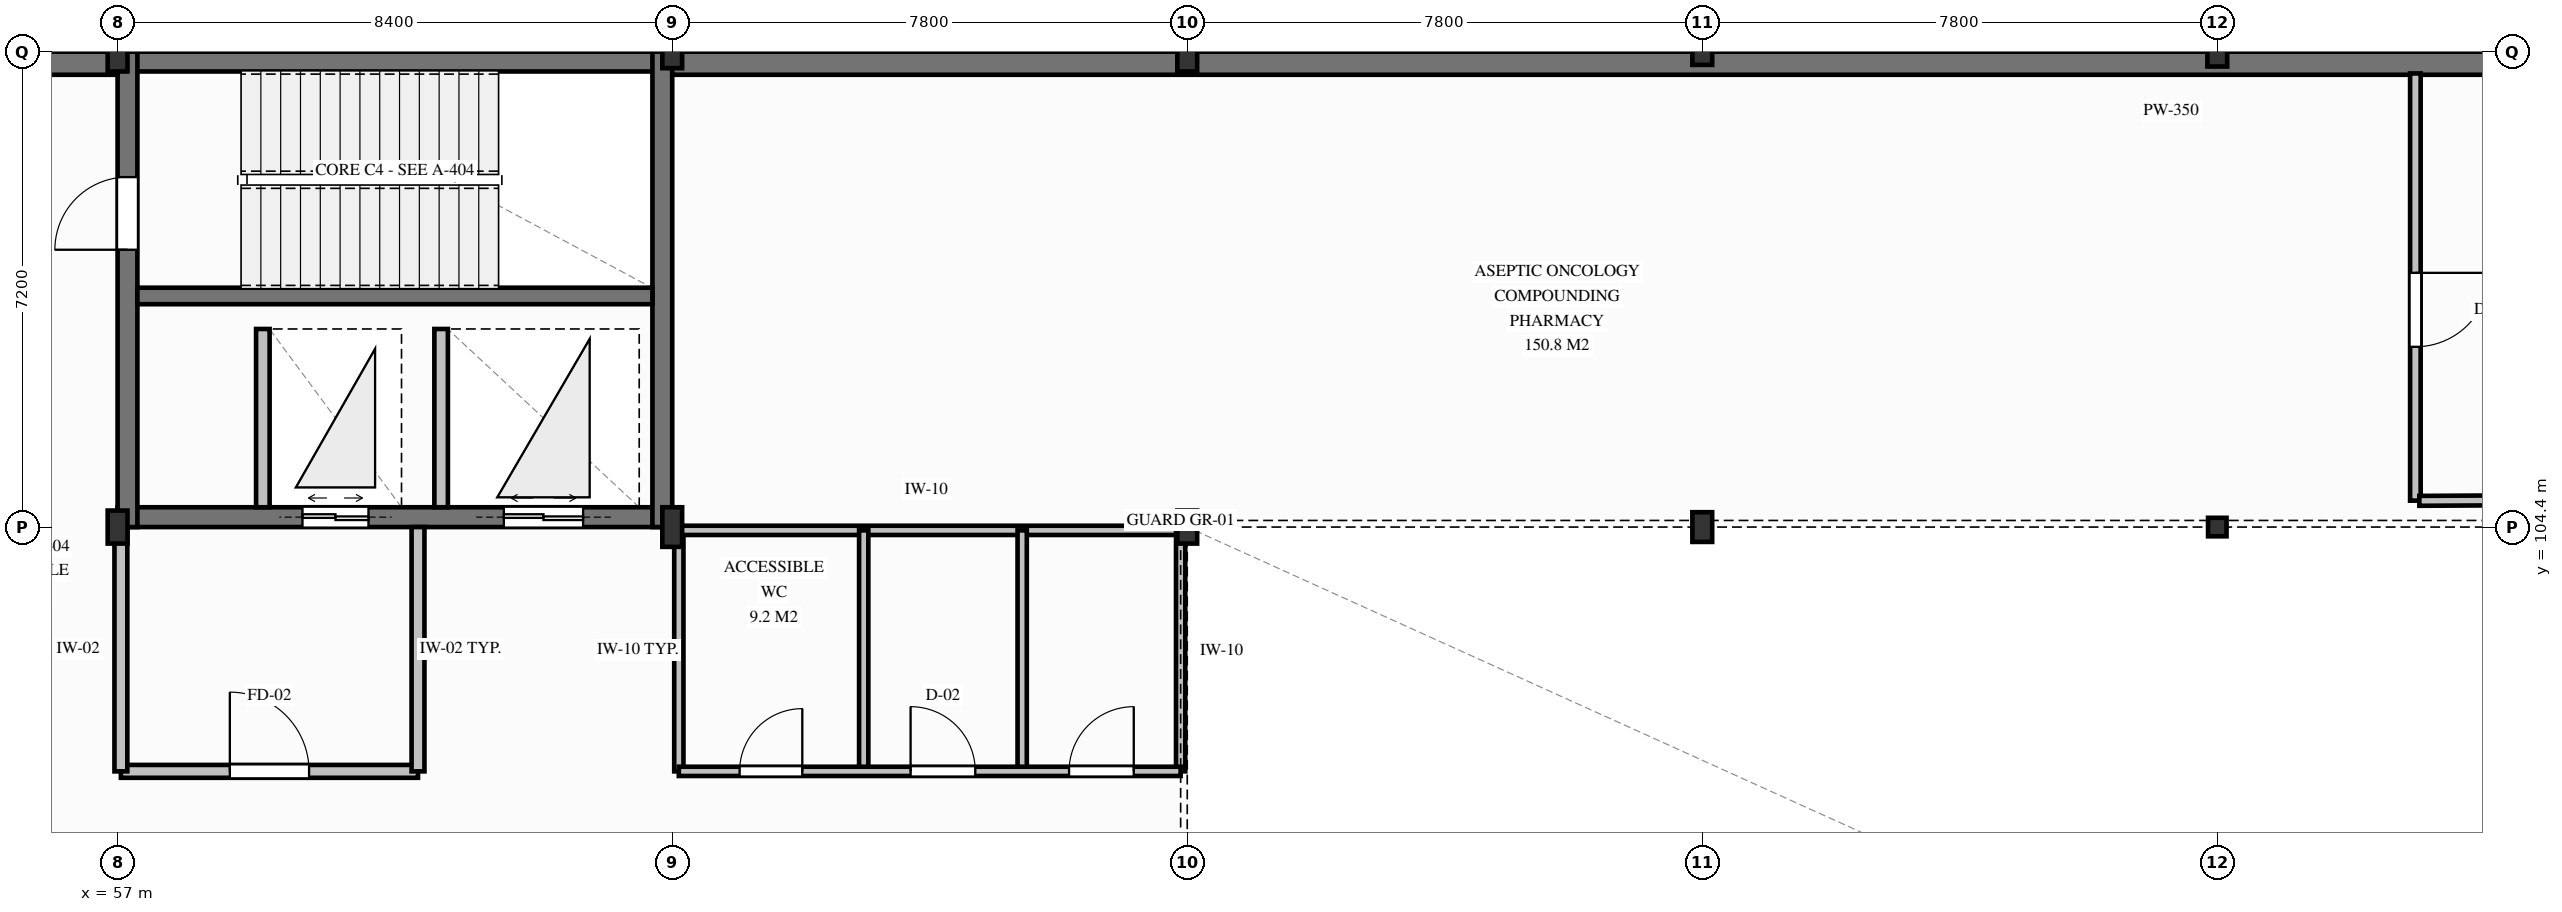
"""IFC4 building model, lengths in metres.
Left out: names, types, materials, properties, quantities, classifications, styles, units other than length and angle.
Written with IfcOpenShell. Run it as: python <this file> out.ifc"""

import sys

from ifc_helpers import new_model, si_unit, direction, frame, frame_2d, origin, origin_2d, place, context, subcontext, project, spatial, rectangle, i_section, extrude, element, fill, save


model = new_model("IFC4")
c1 = context("Model", 3, precision=1e-05, world=origin(), true_north=direction((0.0, 1.0)))
c2 = subcontext(c1, "Body", "Model", "MODEL_VIEW")
j1 = project(units=[si_unit("LENGTHUNIT", "METRE"), si_unit("PLANEANGLEUNIT", "RADIAN")], contexts=[c1])
p1 = place(None, origin())
s1 = spatial("IfcSite", under=j1, at=p1, CompositionType="ELEMENT")
p2 = place(p1, origin())
s2 = spatial("IfcBuilding", under=s1, at=p2, CompositionType="ELEMENT")
p3 = place(p2, frame((0.0, 0.0, 9.0)))
s3 = spatial("IfcBuildingStorey", under=s2, at=p3, CompositionType="ELEMENT", Elevation=9.0)
p4 = place(p3, frame((57.0, 111.45, 0.0), z_axis=(0.0, 0.0, 1.0), x_axis=(1.0, 0.0, 0.0)))
e1 = element("IfcWall", 1, at=p4, inside=s3, PredefinedType="SHEAR", context=c2, shape_type="SweptSolid", body=[
    extrude(rectangle(XDim=8.4, YDim=0.3, at=frame_2d((4.2, 0.0))), origin(), (0.0, 0.0, 1.0), 4.2),
])
p5 = place(p3, frame((57.0, 104.55, 0.0), z_axis=(0.0, 0.0, 1.0), x_axis=(1.0, 0.0, 0.0)))
e2 = element("IfcWall", 2, at=p5, inside=s3, PredefinedType="SHEAR", context=c2, shape_type="SweptSolid", body=[
    extrude(rectangle(XDim=8.4, YDim=0.3, at=frame_2d((4.2, 0.0))), origin(), (0.0, 0.0, 1.0), 4.2),
])
p6 = place(p5, frame((2.8, 0.0, 0.0)))
e3 = element("IfcOpeningElement", 3, at=p6, cuts=e2, PredefinedType="OPENING", context=c2, shape_type="SweptSolid", body=[
    extrude(rectangle(XDim=1.0, YDim=2.1, at=frame_2d((0.5, 1.05))), frame((0.0, 0.16, 0.0), z_axis=(0.0, -1.0, 0.0), x_axis=(1.0, 0.0, 0.0)), (0.0, 0.0, 1.0), 0.32),
])
p7 = place(p5, frame((5.85, 0.0, 0.0)))
e4 = element("IfcOpeningElement", 4, at=p7, cuts=e2, PredefinedType="OPENING", context=c2, shape_type="SweptSolid", body=[
    extrude(rectangle(XDim=1.2, YDim=2.15, at=frame_2d((0.6, 1.075))), frame((0.0, 0.16, 0.0), z_axis=(0.0, -1.0, 0.0), x_axis=(1.0, 0.0, 0.0)), (0.0, 0.0, 1.0), 0.32),
])
p8 = place(p3, frame((57.15, 104.4, 0.0), z_axis=(0.0, 0.0, 1.0), x_axis=(0.0, 1.0, 0.0)))
e5 = element("IfcWall", 5, at=p8, inside=s3, PredefinedType="SHEAR", context=c2, shape_type="SweptSolid", body=[
    extrude(rectangle(XDim=7.2, YDim=0.3, at=frame_2d((3.6, 0.0))), origin(), (0.0, 0.0, 1.0), 4.2),
])
p9 = place(p8, frame((4.2, 0.0, 0.0)))
e6 = element("IfcOpeningElement", 6, at=p9, cuts=e5, PredefinedType="OPENING", context=c2, shape_type="SweptSolid", body=[
    extrude(rectangle(XDim=1.1, YDim=2.15, at=frame_2d((0.55, 1.075))), frame((0.0, 0.16, 0.0), z_axis=(0.0, -1.0, 0.0), x_axis=(1.0, 0.0, 0.0)), (0.0, 0.0, 1.0), 0.32),
])
p10 = place(p3, frame((65.25, 104.4, 0.0), z_axis=(0.0, 0.0, 1.0), x_axis=(0.0, 1.0, 0.0)))
e7 = element("IfcWall", 7, at=p10, inside=s3, PredefinedType="SHEAR", context=c2, shape_type="SweptSolid", body=[
    extrude(rectangle(XDim=7.2, YDim=0.3, at=frame_2d((3.6, 0.0))), origin(), (0.0, 0.0, 1.0), 4.2),
])
p11 = place(p3, frame((57.3, 107.9, 0.0), z_axis=(0.0, 0.0, 1.0), x_axis=(1.0, 0.0, 0.0)))
e8 = element("IfcWall", 8, at=p11, inside=s3, PredefinedType="SHEAR", context=c2, shape_type="SweptSolid", body=[
    extrude(rectangle(XDim=7.8, YDim=0.25, at=frame_2d((3.9, 0.0))), origin(), (0.0, 0.0, 1.0), 4.2),
])
p12 = place(p3, frame((49.2, 111.425, 0.0), z_axis=(0.0, 0.0, 1.0), x_axis=(1.0, 0.0, 0.0)))
e9 = element("IfcWall", 9, at=p12, inside=s3, PredefinedType="SHEAR", context=c2, shape_type="SweptSolid", body=[
    extrude(rectangle(XDim=7.8, YDim=0.35, at=frame_2d((3.9, 0.0))), origin(), (0.0, 0.0, 1.0), 4.2),
])
p13 = place(p3, frame((65.4, 111.425, 0.0), z_axis=(0.0, 0.0, 1.0), x_axis=(1.0, 0.0, 0.0)))
e10 = element("IfcWall", 10, at=p13, inside=s3, PredefinedType="SHEAR", context=c2, shape_type="SweptSolid", body=[
    extrude(rectangle(XDim=48.0, YDim=0.35, at=frame_2d((24.0, 0.0))), origin(), (0.0, 0.0, 1.0), 4.2),
])
p14 = place(p3, frame((57.0, 104.4, 0.0), z_axis=(0.0, 0.0, 1.0), x_axis=(1.0, 0.0, 0.0)))
e11 = element("IfcColumn", 11, at=p14, inside=s3, PredefinedType="COLUMN", context=c2, shape_type="SweptSolid", body=[
    extrude(i_section(OverallWidth=0.3, OverallDepth=0.5, WebThickness=0.014, FlangeThickness=0.028, FilletRadius=0.027, at=origin_2d()), origin(), (0.0, 0.0, 1.0), 4.2),
])
for number, where, z_axis, x_axis in (
    (12, (57.0, 111.6, 0.0), (0.0, 0.0, 1.0), (1.0, 0.0, 0.0)),
    (13, (65.4, 104.4, 0.0), (0.0, 0.0, 1.0), (1.0, 0.0, 0.0)),
):
    element("IfcColumn", number, at=place(p3, frame(where, z_axis=z_axis, x_axis=x_axis)), inside=s3, PredefinedType="COLUMN", context=c2, shape_type="SweptSolid", body=[
        extrude(i_section(OverallWidth=0.3, OverallDepth=0.6, WebThickness=0.015, FlangeThickness=0.03, FilletRadius=0.027, at=origin_2d()), origin(), (0.0, 0.0, 1.0), 4.2),
    ])
for number, where, z_axis, x_axis in (
    (14, (65.4, 111.6, 0.0), (0.0, 0.0, 1.0), (1.0, 0.0, 0.0)),
    (15, (73.2, 104.4, 0.0), (0.0, 0.0, 1.0), (1.0, 0.0, 0.0)),
):
    element("IfcColumn", number, at=place(p3, frame(where, z_axis=z_axis, x_axis=x_axis)), inside=s3, PredefinedType="COLUMN", context=c2, shape_type="SweptSolid", body=[
        extrude(i_section(OverallWidth=0.3, OverallDepth=0.5, WebThickness=0.014, FlangeThickness=0.028, FilletRadius=0.027, at=origin_2d()), origin(), (0.0, 0.0, 1.0), 4.2),
    ])
p15 = place(p3, frame((73.2, 111.6, 0.0), z_axis=(0.0, 0.0, 1.0), x_axis=(1.0, 0.0, 0.0)))
e16 = element("IfcColumn", 16, at=p15, inside=s3, PredefinedType="COLUMN", context=c2, shape_type="SweptSolid", body=[
    extrude(i_section(OverallWidth=0.3, OverallDepth=0.6, WebThickness=0.015, FlangeThickness=0.03, FilletRadius=0.027, at=origin_2d()), origin(), (0.0, 0.0, 1.0), 4.2),
])
p16 = place(p3, frame((81.0, 104.4, 0.0), z_axis=(0.0, 0.0, 1.0), x_axis=(1.0, 0.0, 0.0)))
e17 = element("IfcColumn", 17, at=p16, inside=s3, PredefinedType="COLUMN", context=c2, shape_type="SweptSolid", body=[
    extrude(i_section(OverallWidth=0.3, OverallDepth=0.45, WebThickness=0.014, FlangeThickness=0.026, FilletRadius=0.027, at=origin_2d()), origin(), (0.0, 0.0, 1.0), 4.2),
])
p17 = place(p3, frame((81.0, 111.6, 0.0), z_axis=(0.0, 0.0, 1.0), x_axis=(1.0, 0.0, 0.0)))
e18 = element("IfcColumn", 18, at=p17, inside=s3, PredefinedType="COLUMN", context=c2, shape_type="SweptSolid", body=[
    extrude(i_section(OverallWidth=0.3, OverallDepth=0.4, WebThickness=0.013, FlangeThickness=0.024, FilletRadius=0.027, at=origin_2d()), origin(), (0.0, 0.0, 1.0), 4.2),
])
p18 = place(p3, frame((88.8, 104.4, 0.0), z_axis=(0.0, 0.0, 1.0), x_axis=(1.0, 0.0, 0.0)))
e19 = element("IfcColumn", 19, at=p18, inside=s3, PredefinedType="COLUMN", context=c2, shape_type="SweptSolid", body=[
    extrude(i_section(OverallWidth=0.28, OverallDepth=0.28, WebThickness=0.01, FlangeThickness=0.018, FilletRadius=0.024, at=origin_2d()), origin(), (0.0, 0.0, 1.0), 4.2),
])
p19 = place(p3, frame((88.8, 111.6, 0.0), z_axis=(0.0, 0.0, 1.0), x_axis=(1.0, 0.0, 0.0)))
e20 = element("IfcColumn", 20, at=p19, inside=s3, PredefinedType="COLUMN", context=c2, shape_type="SweptSolid", body=[
    extrude(i_section(OverallWidth=0.3, OverallDepth=0.45, WebThickness=0.014, FlangeThickness=0.026, FilletRadius=0.027, at=origin_2d()), origin(), (0.0, 0.0, 1.0), 4.2),
])
for number, where, z_axis, x_axis in (
    (21, (59.2, 104.7, 0.0), (0.0, 0.0, 1.0), (0.0, 1.0, 0.0)),
    (22, (61.9, 104.7, 0.0), (0.0, 0.0, 1.0), (0.0, 1.0, 0.0)),
):
    element("IfcWall", number, at=place(p3, frame(where, z_axis=z_axis, x_axis=x_axis)), inside=s3, PredefinedType="PARTITIONING", context=c2, shape_type="SweptSolid", body=[
        extrude(rectangle(XDim=2.7, YDim=0.205, at=frame_2d((1.35, 0.0))), origin(), (0.0, 0.0, 1.0), 3.93),
    ])
p20 = place(p3, frame((65.5, 100.7, 0.0), z_axis=(0.0, 0.0, 1.0), x_axis=(0.0, 1.0, 0.0)))
e23 = element("IfcWall", 23, at=p20, inside=s3, PredefinedType="PARTITIONING", context=c2, shape_type="SweptSolid", body=[
    extrude(rectangle(XDim=3.68, YDim=0.14, at=frame_2d((1.84, 0.0))), origin(), (0.0, 0.0, 1.0), 3.428),
])
p21 = place(p3, frame((65.4, 104.35, 0.0), z_axis=(0.0, 0.0, 1.0), x_axis=(1.0, 0.0, 0.0)))
e24 = element("IfcWall", 24, at=p21, inside=s3, PredefinedType="PARTITIONING", context=c2, shape_type="SweptSolid", body=[
    extrude(rectangle(XDim=7.7, YDim=0.14, at=frame_2d((3.85, 0.0))), origin(), (0.0, 0.0, 1.0), 3.378),
])
p22 = place(p3, frame((73.1, 100.7, 0.0), z_axis=(0.0, 0.0, 1.0), x_axis=(0.0, 1.0, 0.0)))
e25 = element("IfcWall", 25, at=p22, inside=s3, PredefinedType="PARTITIONING", context=c2, shape_type="SweptSolid", body=[
    extrude(rectangle(XDim=3.65, YDim=0.14, at=frame_2d((1.825, 0.0))), origin(), (0.0, 0.0, 1.0), 3.378),
])
for number, where, z_axis, x_axis in (
    (26, (68.3, 100.7, 0.0), (0.0, 0.0, 1.0), (0.0, 1.0, 0.0)),
    (27, (70.7, 100.7, 0.0), (0.0, 0.0, 1.0), (0.0, 1.0, 0.0)),
):
    element("IfcWall", number, at=place(p3, frame(where, z_axis=z_axis, x_axis=x_axis)), inside=s3, PredefinedType="PARTITIONING", context=c2, shape_type="SweptSolid", body=[
        extrude(rectangle(XDim=3.65, YDim=0.14, at=frame_2d((1.825, 0.0))), origin(), (0.0, 0.0, 1.0), 3.478),
    ])
p23 = place(p3, frame((65.5, 100.7, 0.0), z_axis=(0.0, 0.0, 1.0), x_axis=(1.0, 0.0, 0.0)))
e28 = element("IfcWall", 28, at=p23, inside=s3, PredefinedType="PARTITIONING", context=c2, shape_type="SweptSolid", body=[
    extrude(rectangle(XDim=7.6, YDim=0.14, at=frame_2d((3.8, 0.0))), origin(), (0.0, 0.0, 1.0), 3.528),
])
p24 = place(p23, frame((0.92, 0.0, 0.0)))
e29 = element("IfcOpeningElement", 29, at=p24, cuts=e28, PredefinedType="OPENING", context=c2, shape_type="SweptSolid", body=[
    extrude(rectangle(XDim=0.95, YDim=2.12, at=frame_2d((0.475, 1.06))), frame((0.0, 0.08, 0.0), z_axis=(0.0, -1.0, 0.0), x_axis=(1.0, 0.0, 0.0)), (0.0, 0.0, 1.0), 0.16),
])
p25 = place(p23, frame((3.51, 0.0, 0.0)))
e30 = element("IfcOpeningElement", 30, at=p25, cuts=e28, PredefinedType="OPENING", context=c2, shape_type="SweptSolid", body=[
    extrude(rectangle(XDim=0.98, YDim=2.14, at=frame_2d((0.49, 1.07))), frame((0.0, 0.08, 0.0), z_axis=(0.0, -1.0, 0.0), x_axis=(1.0, 0.0, 0.0)), (0.0, 0.0, 1.0), 0.16),
])
p26 = place(p23, frame((5.91, 0.0, 0.0)))
e31 = element("IfcOpeningElement", 31, at=p26, cuts=e28, PredefinedType="OPENING", context=c2, shape_type="SweptSolid", body=[
    extrude(rectangle(XDim=0.98, YDim=2.14, at=frame_2d((0.49, 1.07))), frame((0.0, 0.08, 0.0), z_axis=(0.0, -1.0, 0.0), x_axis=(1.0, 0.0, 0.0)), (0.0, 0.0, 1.0), 0.16),
])
p27 = place(p3, frame((57.05, 100.7, 0.0), z_axis=(0.0, 0.0, 1.0), x_axis=(1.0, 0.0, 0.0)))
e32 = element("IfcWall", 32, at=p27, inside=s3, PredefinedType="PARTITIONING", context=c2, shape_type="SweptSolid", body=[
    extrude(rectangle(XDim=4.5, YDim=0.195, at=frame_2d((2.25, 0.0))), origin(), (0.0, 0.0, 1.0), 3.638),
])
p28 = place(p27, frame((1.65, 0.0, 0.0)))
e33 = element("IfcOpeningElement", 33, at=p28, cuts=e32, PredefinedType="OPENING", context=c2, shape_type="SweptSolid", body=[
    extrude(rectangle(XDim=1.2, YDim=2.15, at=frame_2d((0.6, 1.075))), frame((0.0, 0.107, 0.0), z_axis=(0.0, -1.0, 0.0), x_axis=(1.0, 0.0, 0.0)), (0.0, 0.0, 1.0), 0.215),
])
p29 = place(p3, frame((61.55, 100.7, 0.0), z_axis=(0.0, 0.0, 1.0), x_axis=(0.0, 1.0, 0.0)))
e34 = element("IfcWall", 34, at=p29, inside=s3, PredefinedType="PARTITIONING", context=c2, shape_type="SweptSolid", body=[
    extrude(rectangle(XDim=3.7, YDim=0.195, at=frame_2d((1.85, 0.0))), origin(), (0.0, 0.0, 1.0), 3.428),
])
p30 = place(p3, frame((57.05, 100.7, 0.0), z_axis=(0.0, 0.0, 1.0), x_axis=(0.0, 1.0, 0.0)))
e35 = element("IfcWall", 35, at=p30, inside=s3, PredefinedType="PARTITIONING", context=c2, shape_type="SweptSolid", body=[
    extrude(rectangle(XDim=3.7, YDim=0.195, at=frame_2d((1.85, 0.0))), origin(), (0.0, 0.0, 1.0), 3.378),
])
p31 = place(p3, frame((91.8, 111.27, 0.0), z_axis=(0.0, 0.0, 1.0), x_axis=(0.0, -1.0, 0.0)))
e36 = element("IfcWall", 36, at=p31, inside=s3, PredefinedType="PARTITIONING", context=c2, shape_type="SweptSolid", body=[
    extrude(rectangle(XDim=6.47, YDim=0.16, at=frame_2d((3.235, 0.0))), origin(), (0.0, 0.0, 1.0), 3.598),
])
p32 = place(p31, frame((3.02, 0.0, 0.0)))
e37 = element("IfcOpeningElement", 37, at=p32, cuts=e36, PredefinedType="OPENING", context=c2, shape_type="SweptSolid", body=[
    extrude(rectangle(XDim=1.12, YDim=2.18, at=frame_2d((0.56, 1.09))), frame((0.0, 0.09, 0.0), z_axis=(0.0, -1.0, 0.0), x_axis=(1.0, 0.0, 0.0)), (0.0, 0.0, 1.0), 0.18),
])
p33 = place(p3, frame((105.38, 104.87, 0.0), z_axis=(0.0, 0.0, 1.0), x_axis=(-0.999985423809, -0.00539927482, 0.0)))
e38 = element("IfcWall", 38, at=p33, inside=s3, PredefinedType="PARTITIONING", context=c2, shape_type="SweptSolid", body=[
    extrude(rectangle(XDim=13.52, YDim=0.15, at=frame_2d((6.76, 0.0))), origin(), (0.0, 0.0, 1.0), 3.478),
])
p34 = place(p9, origin())
e39 = element("IfcDoor", 39, at=p34, inside=s3, OperationType="SINGLE_SWING_LEFT", PredefinedType="DOOR", context=c2, shape_type="SweptSolid", body=[
    extrude(rectangle(XDim=1.1, YDim=2.15, at=frame_2d((0.55, 1.075))), frame((0.0, 0.025, 0.0), z_axis=(0.0, -1.0, 0.0), x_axis=(1.0, 0.0, 0.0)), (0.0, 0.0, 1.0), 0.05),
])
fill(e6, e39)
p35 = place(p6, origin())
e40 = element("IfcDoor", 40, at=p35, inside=s3, OperationType="DOUBLE_DOOR_SLIDING", PredefinedType="DOOR", context=c2, shape_type="SweptSolid", body=[
    extrude(rectangle(XDim=1.0, YDim=2.1, at=frame_2d((0.5, 1.05))), frame((0.0, 0.025, 0.0), z_axis=(0.0, -1.0, 0.0), x_axis=(1.0, 0.0, 0.0)), (0.0, 0.0, 1.0), 0.05),
])
fill(e3, e40)
p36 = place(p7, origin())
e41 = element("IfcDoor", 41, at=p36, inside=s3, OperationType="DOUBLE_DOOR_SLIDING", PredefinedType="DOOR", context=c2, shape_type="SweptSolid", body=[
    extrude(rectangle(XDim=1.2, YDim=2.15, at=frame_2d((0.6, 1.075))), frame((0.0, 0.025, 0.0), z_axis=(0.0, -1.0, 0.0), x_axis=(1.0, 0.0, 0.0)), (0.0, 0.0, 1.0), 0.05),
])
fill(e4, e41)
p37 = place(p24, origin())
e42 = element("IfcDoor", 42, at=p37, inside=s3, OperationType="SINGLE_SWING_RIGHT", PredefinedType="DOOR", context=c2, shape_type="SweptSolid", body=[
    extrude(rectangle(XDim=0.95, YDim=2.12, at=frame_2d((0.475, 1.06))), frame((0.0, 0.025, 0.0), z_axis=(0.0, -1.0, 0.0), x_axis=(1.0, 0.0, 0.0)), (0.0, 0.0, 1.0), 0.05),
])
fill(e29, e42)
p38 = place(p25, origin())
e43 = element("IfcDoor", 43, at=p38, inside=s3, OperationType="SINGLE_SWING_LEFT", PredefinedType="DOOR", context=c2, shape_type="SweptSolid", body=[
    extrude(rectangle(XDim=0.98, YDim=2.14, at=frame_2d((0.49, 1.07))), frame((0.0, 0.025, 0.0), z_axis=(0.0, -1.0, 0.0), x_axis=(1.0, 0.0, 0.0)), (0.0, 0.0, 1.0), 0.05),
])
fill(e30, e43)
p39 = place(p26, origin())
e44 = element("IfcDoor", 44, at=p39, inside=s3, OperationType="SINGLE_SWING_RIGHT", PredefinedType="DOOR", context=c2, shape_type="SweptSolid", body=[
    extrude(rectangle(XDim=0.98, YDim=2.14, at=frame_2d((0.49, 1.07))), frame((0.0, 0.025, 0.0), z_axis=(0.0, -1.0, 0.0), x_axis=(1.0, 0.0, 0.0)), (0.0, 0.0, 1.0), 0.05),
])
fill(e31, e44)
p40 = place(p28, origin())
e45 = element("IfcDoor", 45, at=p40, inside=s3, OperationType="SINGLE_SWING_LEFT", PredefinedType="DOOR", context=c2, shape_type="SweptSolid", body=[
    extrude(rectangle(XDim=1.2, YDim=2.15, at=frame_2d((0.6, 1.075))), frame((0.0, 0.025, 0.0), z_axis=(0.0, -1.0, 0.0), x_axis=(1.0, 0.0, 0.0)), (0.0, 0.0, 1.0), 0.05),
])
fill(e33, e45)
p41 = place(p32, origin())
e46 = element("IfcDoor", 46, at=p41, inside=s3, OperationType="SINGLE_SWING_LEFT", PredefinedType="DOOR", context=c2, shape_type="SweptSolid", body=[
    extrude(rectangle(XDim=1.12, YDim=2.18, at=frame_2d((0.56, 1.09))), frame((0.0, 0.025, 0.0), z_axis=(0.0, -1.0, 0.0), x_axis=(1.0, 0.0, 0.0)), (0.0, 0.0, 1.0), 0.05),
])
fill(e37, e46)
save(model, sys.argv[1])
